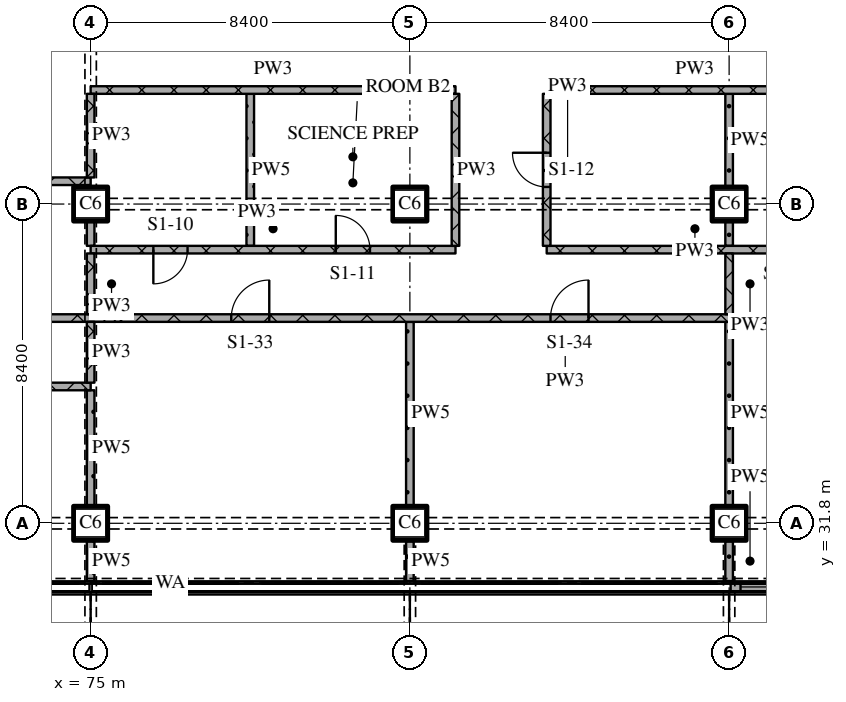
"""IFC4 building model, lengths in metres.
Left out: names, types, materials, properties, quantities, classifications, styles, units other than length and angle.
Written with IfcOpenShell. Run it as: python <this file> out.ifc"""

import sys

from ifc_helpers import new_model, si_unit, direction, frame, frame_2d, origin, origin_2d, place, context, subcontext, project, spatial, rectangle, extrude, element, fill, save


model = new_model("IFC4")
c1 = context("Model", 3, precision=1e-05, world=origin(), true_north=direction((0.0, 1.0)))
c2 = subcontext(c1, "Body", "Model", "MODEL_VIEW")
j1 = project(units=[si_unit("LENGTHUNIT", "METRE"), si_unit("PLANEANGLEUNIT", "RADIAN")], contexts=[c1])
p1 = place(None, origin())
s1 = spatial("IfcSite", under=j1, at=p1, CompositionType="ELEMENT")
p2 = place(p1, origin())
s2 = spatial("IfcBuilding", under=s1, at=p2, CompositionType="ELEMENT")
p3 = place(p2, frame((0.0, 0.0, 19.2)))
s3 = spatial("IfcBuildingStorey", under=s2, at=p3, CompositionType="ELEMENT", Elevation=19.2)
for number, where, z_axis, x_axis in (
    (1, (75.0, 31.8, 0.0), (0.0, 0.0, 1.0), (1.0, 0.0, 0.0)),
    (2, (75.0, 40.2, 0.0), (0.0, 0.0, 1.0), (1.0, 0.0, 0.0)),
    (3, (83.4, 31.8, 0.0), (0.0, 0.0, 1.0), (1.0, 0.0, 0.0)),
    (4, (83.4, 40.2, 0.0), (0.0, 0.0, 1.0), (1.0, 0.0, 0.0)),
    (5, (91.8, 31.8, 0.0), (0.0, 0.0, 1.0), (1.0, 0.0, 0.0)),
    (6, (91.8, 40.2, 0.0), (0.0, 0.0, 1.0), (1.0, 0.0, 0.0)),
):
    element("IfcColumn", number, at=place(p3, frame(where, z_axis=z_axis, x_axis=x_axis)), inside=s3, PredefinedType="COLUMN", context=c2, shape_type="SweptSolid", body=[
        extrude(rectangle(XDim=0.9, YDim=0.9, at=origin_2d()), origin(), (0.0, 0.0, 1.0), 4.5),
    ])
p4 = place(p3, frame((95.96, 30.125, 0.0), z_axis=(0.0, 0.0, 1.0), x_axis=(-1.0, 0.0, 0.0)))
e7 = element("IfcWall", 7, at=p4, inside=s3, PredefinedType="SOLIDWALL", context=c2, shape_type="SweptSolid", body=[
    extrude(rectangle(XDim=4.12, YDim=0.25, at=frame_2d((2.06, 0.0))), origin(), (0.0, 0.0, 1.0), 4.2),
])
p5 = place(p4, frame((1.06, 0.0, 0.0)))
e8 = element("IfcOpeningElement", 8, at=p5, cuts=e7, PredefinedType="OPENING", context=c2, shape_type="SweptSolid", body=[
    extrude(rectangle(XDim=2.0, YDim=2.4, at=frame_2d((1.0, 1.2))), frame((0.0, 0.135, 0.0), z_axis=(0.0, -1.0, 0.0), x_axis=(1.0, 0.0, 0.0)), (0.0, 0.0, 1.0), 0.27),
])
p6 = place(p4, frame((0.26, 0.0, 2.7)))
e9 = element("IfcOpeningElement", 9, at=p6, cuts=e7, PredefinedType="OPENING", context=c2, shape_type="SweptSolid", body=[
    extrude(rectangle(XDim=3.6, YDim=1.1, at=frame_2d((1.8, 0.55))), frame((0.0, 0.135, 0.0), z_axis=(0.0, -1.0, 0.0), x_axis=(1.0, 0.0, 0.0)), (0.0, 0.0, 1.0), 0.27),
])
p7 = place(p3, frame((75.0, 35.4, 0.0), z_axis=(0.0, 0.0, 1.0), x_axis=(-1.0, 0.0, 0.0)))
e10 = element("IfcWall", 10, at=p7, inside=s3, PredefinedType="PARTITIONING", context=c2, shape_type="SweptSolid", body=[
    extrude(rectangle(XDim=26.72, YDim=0.2, at=frame_2d((13.36, 0.0))), origin(), (0.0, 0.0, 1.0), 4.2),
])
p8 = place(p7, frame((11.431, 0.0, 0.0)))
e11 = element("IfcOpeningElement", 11, at=p8, cuts=e10, PredefinedType="OPENING", context=c2, shape_type="SweptSolid", body=[
    extrude(rectangle(XDim=1.0, YDim=2.1, at=frame_2d((0.5, 1.05))), frame((0.0, 0.11, 0.0), z_axis=(0.0, -1.0, 0.0), x_axis=(1.0, 0.0, 0.0)), (0.0, 0.0, 1.0), 0.22),
])
p9 = place(p3, frame((63.9, 37.2, 0.0), z_axis=(0.0, 0.0, 1.0), x_axis=(1.0, 0.0, 0.0)))
e12 = element("IfcWall", 12, at=p9, inside=s3, PredefinedType="PARTITIONING", context=c2, shape_type="SweptSolid", body=[
    extrude(rectangle(XDim=11.9, YDim=0.2, at=frame_2d((5.95, 0.0))), origin(), (0.0, 0.0, 1.0), 4.2),
])
p10 = place(p9, frame((4.05, 0.0, 0.0)))
e13 = element("IfcOpeningElement", 13, at=p10, cuts=e12, PredefinedType="OPENING", context=c2, shape_type="SweptSolid", body=[
    extrude(rectangle(XDim=0.9, YDim=2.1, at=frame_2d((0.45, 1.05))), frame((0.0, 0.11, 0.0), z_axis=(0.0, -1.0, 0.0), x_axis=(1.0, 0.0, 0.0)), (0.0, 0.0, 1.0), 0.22),
])
p11 = place(p9, frame((8.1, 0.0, 0.0)))
e14 = element("IfcOpeningElement", 14, at=p11, cuts=e12, PredefinedType="OPENING", context=c2, shape_type="SweptSolid", body=[
    extrude(rectangle(XDim=0.9, YDim=2.1, at=frame_2d((0.45, 1.05))), frame((0.0, 0.11, 0.0), z_axis=(0.0, -1.0, 0.0), x_axis=(1.0, 0.0, 0.0)), (0.0, 0.0, 1.0), 0.22),
])
p12 = place(p3, frame((99.175, 37.2, 0.0), z_axis=(0.0, 0.0, 1.0), x_axis=(-1.0, 0.0, 0.0)))
e15 = element("IfcWall", 15, at=p12, inside=s3, PredefinedType="PARTITIONING", context=c2, shape_type="SweptSolid", body=[
    extrude(rectangle(XDim=23.375, YDim=0.2, at=frame_2d((11.688, 0.0))), origin(), (0.0, 0.0, 1.0), 4.2),
])
p13 = place(p12, frame((2.675, 0.0, 0.0)))
e16 = element("IfcOpeningElement", 16, at=p13, cuts=e15, PredefinedType="OPENING", context=c2, shape_type="SweptSolid", body=[
    extrude(rectangle(XDim=1.0, YDim=2.1, at=frame_2d((0.5, 1.05))), frame((0.0, 0.11, 0.0), z_axis=(0.0, -1.0, 0.0), x_axis=(1.0, 0.0, 0.0)), (0.0, 0.0, 1.0), 0.22),
])
p14 = place(p12, frame((11.075, 0.0, 0.0)))
e17 = element("IfcOpeningElement", 17, at=p14, cuts=e15, PredefinedType="OPENING", context=c2, shape_type="SweptSolid", body=[
    extrude(rectangle(XDim=1.0, YDim=2.1, at=frame_2d((0.5, 1.05))), frame((0.0, 0.11, 0.0), z_axis=(0.0, -1.0, 0.0), x_axis=(1.0, 0.0, 0.0)), (0.0, 0.0, 1.0), 0.22),
])
p15 = place(p12, frame((19.475, 0.0, 0.0)))
e18 = element("IfcOpeningElement", 18, at=p15, cuts=e15, PredefinedType="OPENING", context=c2, shape_type="SweptSolid", body=[
    extrude(rectangle(XDim=1.0, YDim=2.1, at=frame_2d((0.5, 1.05))), frame((0.0, 0.11, 0.0), z_axis=(0.0, -1.0, 0.0), x_axis=(1.0, 0.0, 0.0)), (0.0, 0.0, 1.0), 0.22),
])
p16 = place(p3, frame((75.0, 39.0, 0.0), z_axis=(0.0, 0.0, 1.0), x_axis=(1.0, 0.0, 0.0)))
e19 = element("IfcWall", 19, at=p16, inside=s3, PredefinedType="PARTITIONING", context=c2, shape_type="SweptSolid", body=[
    extrude(rectangle(XDim=9.6, YDim=0.2, at=frame_2d((4.8, 0.0))), origin(), (0.0, 0.0, 1.0), 4.2),
])
p17 = place(p16, frame((1.65, 0.0, 0.0)))
e20 = element("IfcOpeningElement", 20, at=p17, cuts=e19, PredefinedType="OPENING", context=c2, shape_type="SweptSolid", body=[
    extrude(rectangle(XDim=0.9, YDim=2.1, at=frame_2d((0.45, 1.05))), frame((0.0, 0.11, 0.0), z_axis=(0.0, -1.0, 0.0), x_axis=(1.0, 0.0, 0.0)), (0.0, 0.0, 1.0), 0.22),
])
p18 = place(p16, frame((6.45, 0.0, 0.0)))
e21 = element("IfcOpeningElement", 21, at=p18, cuts=e19, PredefinedType="OPENING", context=c2, shape_type="SweptSolid", body=[
    extrude(rectangle(XDim=0.9, YDim=2.1, at=frame_2d((0.45, 1.05))), frame((0.0, 0.11, 0.0), z_axis=(0.0, -1.0, 0.0), x_axis=(1.0, 0.0, 0.0)), (0.0, 0.0, 1.0), 0.22),
])
p19 = place(p3, frame((87.0, 39.0, 0.0), z_axis=(0.0, 0.0, 1.0), x_axis=(1.0, 0.0, 0.0)))
e22 = element("IfcWall", 22, at=p19, inside=s3, PredefinedType="PARTITIONING", context=c2, shape_type="SweptSolid", body=[
    extrude(rectangle(XDim=7.8, YDim=0.2, at=frame_2d((3.9, 0.0))), origin(), (0.0, 0.0, 1.0), 4.2),
])
p20 = place(p19, frame((5.85, 0.0, 0.0)))
e23 = element("IfcOpeningElement", 23, at=p20, cuts=e22, PredefinedType="OPENING", context=c2, shape_type="SweptSolid", body=[
    extrude(rectangle(XDim=0.9, YDim=2.1, at=frame_2d((0.45, 1.05))), frame((0.0, 0.11, 0.0), z_axis=(0.0, -1.0, 0.0), x_axis=(1.0, 0.0, 0.0)), (0.0, 0.0, 1.0), 0.22),
])
p21 = place(p3, frame((63.9, 40.8, 0.0), z_axis=(0.0, 0.0, 1.0), x_axis=(1.0, 0.0, 0.0)))
e24 = element("IfcWall", 24, at=p21, inside=s3, PredefinedType="PARTITIONING", context=c2, shape_type="SweptSolid", body=[
    extrude(rectangle(XDim=11.1, YDim=0.2, at=frame_2d((5.55, 0.0))), origin(), (0.0, 0.0, 1.0), 4.2),
])
p22 = place(p3, frame((75.0, 43.2, 0.0), z_axis=(0.0, 0.0, 1.0), x_axis=(1.0, 0.0, 0.0)))
e25 = element("IfcWall", 25, at=p22, inside=s3, PredefinedType="PARTITIONING", context=c2, shape_type="SweptSolid", body=[
    extrude(rectangle(XDim=9.6, YDim=0.2, at=frame_2d((4.8, 0.0))), origin(), (0.0, 0.0, 1.0), 4.2),
])
p23 = place(p3, frame((87.0, 43.2, 0.0), z_axis=(0.0, 0.0, 1.0), x_axis=(1.0, 0.0, 0.0)))
e26 = element("IfcWall", 26, at=p23, inside=s3, PredefinedType="PARTITIONING", context=c2, shape_type="SweptSolid", body=[
    extrude(rectangle(XDim=7.8, YDim=0.2, at=frame_2d((3.9, 0.0))), origin(), (0.0, 0.0, 1.0), 4.2),
])
p24 = place(p3, frame((75.0, 43.1, 0.0), z_axis=(0.0, 0.0, 1.0), x_axis=(0.0, -1.0, 0.0)))
e27 = element("IfcWall", 27, at=p24, inside=s3, PredefinedType="PARTITIONING", context=c2, shape_type="SweptSolid", body=[
    extrude(rectangle(XDim=2.2, YDim=0.2, at=frame_2d((1.1, 0.0))), origin(), (0.0, 0.0, 1.0), 3.3),
])
p25 = place(p3, frame((75.0, 31.33, 0.0), z_axis=(0.0, 0.0, 1.0), x_axis=(0.0, -1.0, 0.0)))
e28 = element("IfcWall", 28, at=p25, inside=s3, PredefinedType="PARTITIONING", context=c2, shape_type="SweptSolid", body=[
    extrude(rectangle(XDim=1.05, YDim=0.2, at=frame_2d((0.525, 0.0))), origin(), (0.0, 0.0, 1.0), 4.2),
])
p26 = place(p3, frame((75.0, 35.3, 0.0), z_axis=(0.0, 0.0, 1.0), x_axis=(0.0, -1.0, 0.0)))
e29 = element("IfcWall", 29, at=p26, inside=s3, PredefinedType="PARTITIONING", context=c2, shape_type="SweptSolid", body=[
    extrude(rectangle(XDim=3.03, YDim=0.2, at=frame_2d((1.515, 0.0))), origin(), (0.0, 0.0, 1.0), 3.7),
])
p27 = place(p3, frame((75.0, 39.73, 0.0), z_axis=(0.0, 0.0, 1.0), x_axis=(0.0, -1.0, 0.0)))
e30 = element("IfcWall", 30, at=p27, inside=s3, PredefinedType="PARTITIONING", context=c2, shape_type="SweptSolid", body=[
    extrude(rectangle(XDim=0.63, YDim=0.2, at=frame_2d((0.315, 0.0))), origin(), (0.0, 0.0, 1.0), 3.7),
])
p28 = place(p3, frame((79.2, 43.1, 0.0), z_axis=(0.0, 0.0, 1.0), x_axis=(0.0, -1.0, 0.0)))
e31 = element("IfcWall", 31, at=p28, inside=s3, PredefinedType="PARTITIONING", context=c2, shape_type="SweptSolid", body=[
    extrude(rectangle(XDim=4.0, YDim=0.2, at=frame_2d((2.0, 0.0))), origin(), (0.0, 0.0, 1.0), 4.2),
])
p29 = place(p3, frame((83.4, 31.33, 0.0), z_axis=(0.0, 0.0, 1.0), x_axis=(0.0, -1.0, 0.0)))
e32 = element("IfcWall", 32, at=p29, inside=s3, PredefinedType="PARTITIONING", context=c2, shape_type="SweptSolid", body=[
    extrude(rectangle(XDim=1.05, YDim=0.2, at=frame_2d((0.525, 0.0))), origin(), (0.0, 0.0, 1.0), 4.2),
])
p30 = place(p3, frame((83.4, 37.1, 0.0), z_axis=(0.0, 0.0, 1.0), x_axis=(0.0, -1.0, 0.0)))
e33 = element("IfcWall", 33, at=p30, inside=s3, PredefinedType="PARTITIONING", context=c2, shape_type="SweptSolid", body=[
    extrude(rectangle(XDim=4.83, YDim=0.2, at=frame_2d((2.415, 0.0))), origin(), (0.0, 0.0, 1.0), 4.2),
])
p31 = place(p3, frame((84.6, 43.1, 0.0), z_axis=(0.0, 0.0, 1.0), x_axis=(0.0, -1.0, 0.0)))
e34 = element("IfcWall", 34, at=p31, inside=s3, PredefinedType="PARTITIONING", context=c2, shape_type="SweptSolid", body=[
    extrude(rectangle(XDim=4.0, YDim=0.2, at=frame_2d((2.0, 0.0))), origin(), (0.0, 0.0, 1.0), 4.2),
])
p32 = place(p3, frame((87.0, 43.1, 0.0), z_axis=(0.0, 0.0, 1.0), x_axis=(0.0, -1.0, 0.0)))
e35 = element("IfcWall", 35, at=p32, inside=s3, PredefinedType="PARTITIONING", context=c2, shape_type="SweptSolid", body=[
    extrude(rectangle(XDim=4.0, YDim=0.2, at=frame_2d((2.0, 0.0))), origin(), (0.0, 0.0, 1.0), 4.2),
])
p33 = place(p32, frame((1.55, 0.0, 0.0)))
e36 = element("IfcOpeningElement", 36, at=p33, cuts=e35, PredefinedType="OPENING", context=c2, shape_type="SweptSolid", body=[
    extrude(rectangle(XDim=0.9, YDim=2.1, at=frame_2d((0.45, 1.05))), frame((0.0, 0.11, 0.0), z_axis=(0.0, -1.0, 0.0), x_axis=(1.0, 0.0, 0.0)), (0.0, 0.0, 1.0), 0.22),
])
p34 = place(p3, frame((91.8, 38.9, 0.0), z_axis=(0.0, 0.0, 1.0), x_axis=(0.0, -1.0, 0.0)))
e37 = element("IfcWall", 37, at=p34, inside=s3, PredefinedType="PARTITIONING", context=c2, shape_type="SweptSolid", body=[
    extrude(rectangle(XDim=1.6, YDim=0.2, at=frame_2d((0.8, 0.0))), origin(), (0.0, 0.0, 1.0), 4.2),
])
p35 = place(p3, frame((91.8, 31.33, 0.0), z_axis=(0.0, 0.0, 1.0), x_axis=(0.0, -1.0, 0.0)))
e38 = element("IfcWall", 38, at=p35, inside=s3, PredefinedType="PARTITIONING", context=c2, shape_type="SweptSolid", body=[
    extrude(rectangle(XDim=1.05, YDim=0.2, at=frame_2d((0.525, 0.0))), origin(), (0.0, 0.0, 1.0), 4.2),
])
p36 = place(p3, frame((91.8, 37.1, 0.0), z_axis=(0.0, 0.0, 1.0), x_axis=(0.0, -1.0, 0.0)))
e39 = element("IfcWall", 39, at=p36, inside=s3, PredefinedType="PARTITIONING", context=c2, shape_type="SweptSolid", body=[
    extrude(rectangle(XDim=4.83, YDim=0.2, at=frame_2d((2.415, 0.0))), origin(), (0.0, 0.0, 1.0), 4.2),
])
p37 = place(p3, frame((91.8, 39.73, 0.0), z_axis=(0.0, 0.0, 1.0), x_axis=(0.0, -1.0, 0.0)))
e40 = element("IfcWall", 40, at=p37, inside=s3, PredefinedType="PARTITIONING", context=c2, shape_type="SweptSolid", body=[
    extrude(rectangle(XDim=0.63, YDim=0.2, at=frame_2d((0.315, 0.0))), origin(), (0.0, 0.0, 1.0), 4.2),
])
p38 = place(p3, frame((91.8, 43.1, 0.0), z_axis=(0.0, 0.0, 1.0), x_axis=(0.0, -1.0, 0.0)))
e41 = element("IfcWall", 41, at=p38, inside=s3, PredefinedType="PARTITIONING", context=c2, shape_type="SweptSolid", body=[
    extrude(rectangle(XDim=2.43, YDim=0.2, at=frame_2d((1.215, 0.0))), origin(), (0.0, 0.0, 1.0), 4.2),
])
p39 = place(p3, frame((75.0, 37.1, 0.0), z_axis=(0.0, 0.0, 1.0), x_axis=(0.0, -1.0, 0.0)))
e42 = element("IfcWall", 42, at=p39, inside=s3, PredefinedType="PARTITIONING", context=c2, shape_type="SweptSolid", body=[
    extrude(rectangle(XDim=1.6, YDim=0.2, at=frame_2d((0.8, 0.0))), origin(), (0.0, 0.0, 1.0), 3.7),
])
p40 = place(p3, frame((75.0, 38.9, 0.0), z_axis=(0.0, 0.0, 1.0), x_axis=(0.0, -1.0, 0.0)))
e43 = element("IfcWall", 43, at=p40, inside=s3, PredefinedType="PARTITIONING", context=c2, shape_type="SweptSolid", body=[
    extrude(rectangle(XDim=1.6, YDim=0.2, at=frame_2d((0.8, 0.0))), origin(), (0.0, 0.0, 1.0), 3.7),
])
p41 = place(p6, origin())
e44 = element("IfcWindow", 44, at=p41, inside=s3, PartitioningType="SINGLE_PANEL", PredefinedType="WINDOW", context=c2, shape_type="SweptSolid", body=[
    extrude(rectangle(XDim=3.6, YDim=1.1, at=frame_2d((1.8, 0.55))), frame((0.0, 0.03, 0.0), z_axis=(0.0, -1.0, 0.0), x_axis=(1.0, 0.0, 0.0)), (0.0, 0.0, 1.0), 0.06),
])
fill(e9, e44)
p42 = place(p14, origin())
e45 = element("IfcDoor", 45, at=p42, inside=s3, OperationType="SINGLE_SWING_RIGHT", PredefinedType="DOOR", context=c2, shape_type="SweptSolid", body=[
    extrude(rectangle(XDim=1.0, YDim=2.1, at=frame_2d((0.5, 1.05))), frame((0.0, 0.025, 0.0), z_axis=(0.0, -1.0, 0.0), x_axis=(1.0, 0.0, 0.0)), (0.0, 0.0, 1.0), 0.05),
])
fill(e17, e45)
p43 = place(p15, origin())
e46 = element("IfcDoor", 46, at=p43, inside=s3, OperationType="SINGLE_SWING_RIGHT", PredefinedType="DOOR", context=c2, shape_type="SweptSolid", body=[
    extrude(rectangle(XDim=1.0, YDim=2.1, at=frame_2d((0.5, 1.05))), frame((0.0, 0.025, 0.0), z_axis=(0.0, -1.0, 0.0), x_axis=(1.0, 0.0, 0.0)), (0.0, 0.0, 1.0), 0.05),
])
fill(e18, e46)
p44 = place(p17, origin())
e47 = element("IfcDoor", 47, at=p44, inside=s3, OperationType="SINGLE_SWING_RIGHT", PredefinedType="DOOR", context=c2, shape_type="SweptSolid", body=[
    extrude(rectangle(XDim=0.9, YDim=2.1, at=frame_2d((0.45, 1.05))), frame((0.0, 0.025, 0.0), z_axis=(0.0, -1.0, 0.0), x_axis=(1.0, 0.0, 0.0)), (0.0, 0.0, 1.0), 0.05),
])
fill(e20, e47)
p45 = place(p18, origin())
e48 = element("IfcDoor", 48, at=p45, inside=s3, OperationType="SINGLE_SWING_LEFT", PredefinedType="DOOR", context=c2, shape_type="SweptSolid", body=[
    extrude(rectangle(XDim=0.9, YDim=2.1, at=frame_2d((0.45, 1.05))), frame((0.0, 0.025, 0.0), z_axis=(0.0, -1.0, 0.0), x_axis=(1.0, 0.0, 0.0)), (0.0, 0.0, 1.0), 0.05),
])
fill(e21, e48)
p46 = place(p33, origin())
e49 = element("IfcDoor", 49, at=p46, inside=s3, OperationType="SINGLE_SWING_RIGHT", PredefinedType="DOOR", context=c2, shape_type="SweptSolid", body=[
    extrude(rectangle(XDim=0.9, YDim=2.1, at=frame_2d((0.45, 1.05))), frame((0.0, 0.025, 0.0), z_axis=(0.0, -1.0, 0.0), x_axis=(1.0, 0.0, 0.0)), (0.0, 0.0, 1.0), 0.05),
])
fill(e36, e49)
save(model, sys.argv[1])
